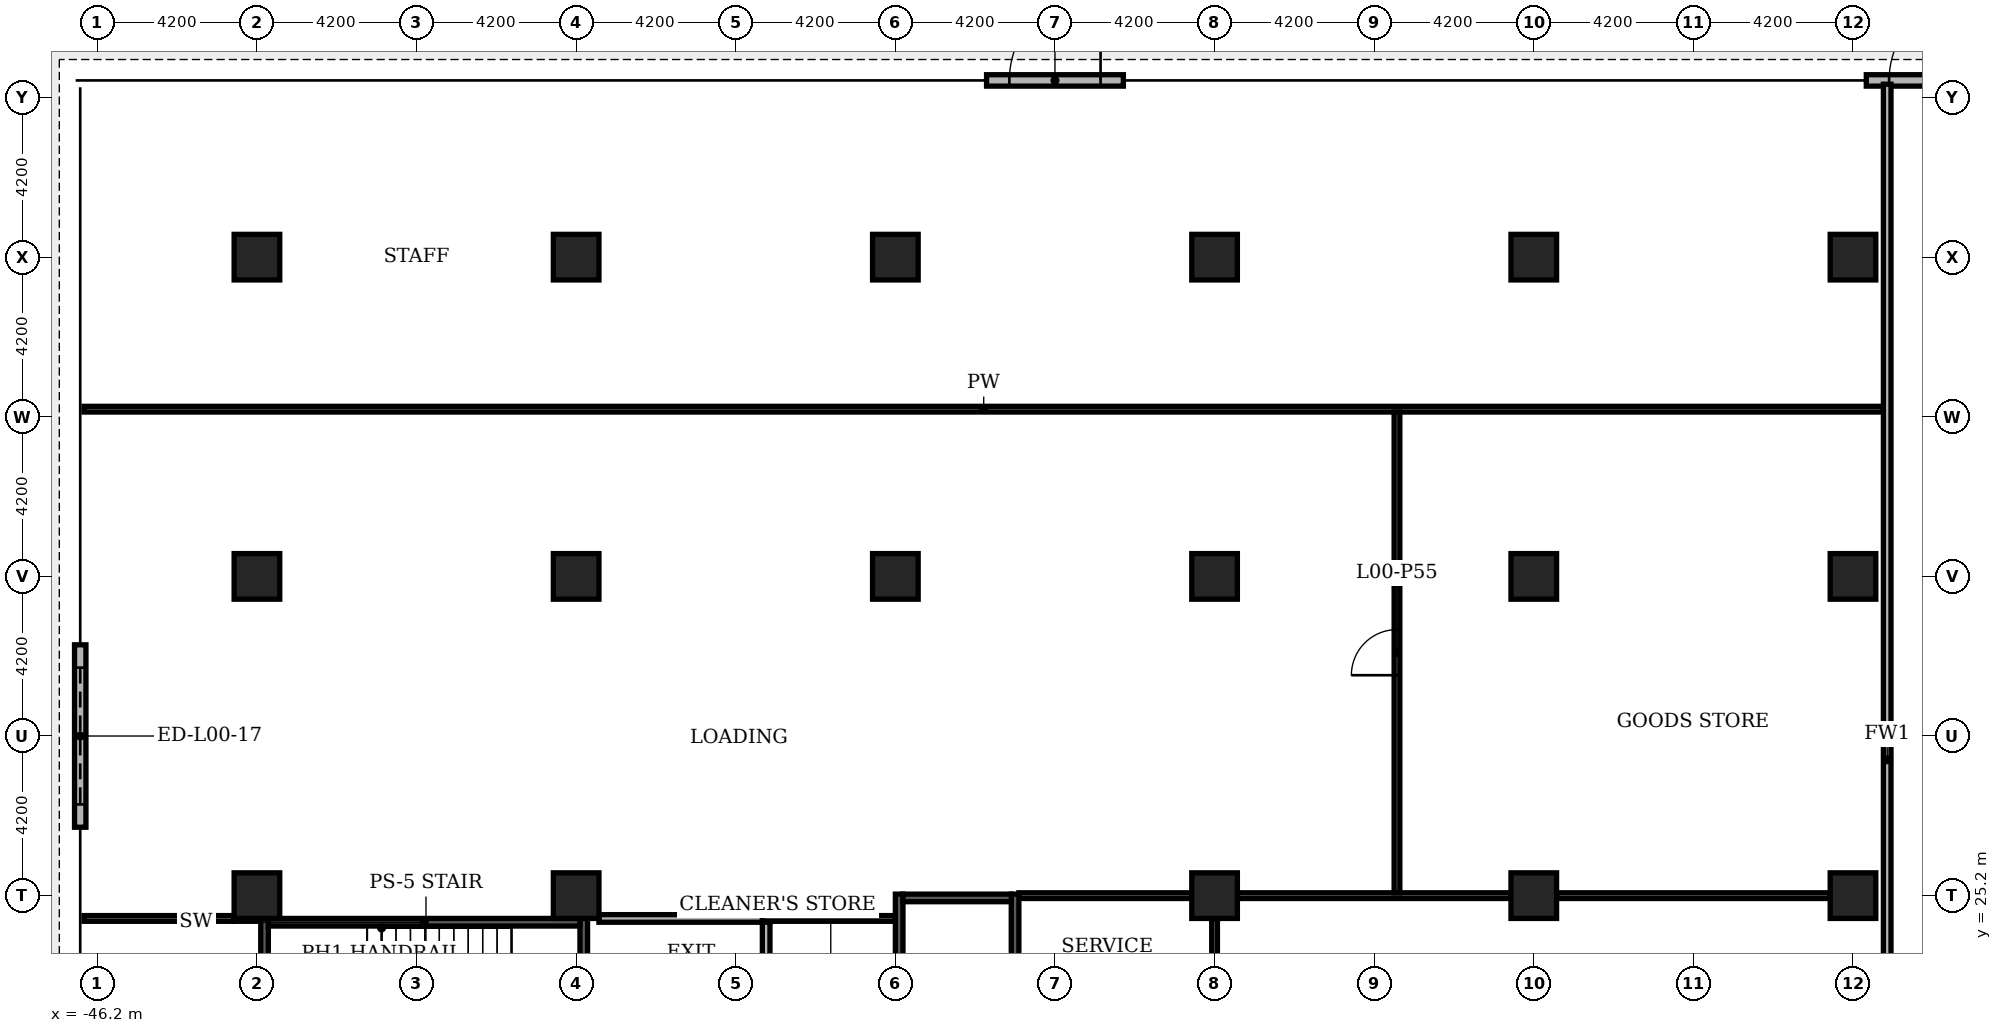
"""IFC4 building model, lengths in metres.
Left out: names, types, materials, properties, quantities, classifications, styles, units other than length and angle.
Written with IfcOpenShell. Run it as: python <this file> out.ifc"""

import sys

from ifc_helpers import new_model, si_unit, direction, frame, frame_2d, origin, origin_2d, place, context, subcontext, project, spatial, rectangle, extrude, element, fill, save


model = new_model("IFC4")
c1 = context("Model", 3, precision=1e-05, world=origin(), true_north=direction((0.0, 1.0)))
c2 = subcontext(c1, "Body", "Model", "MODEL_VIEW")
j1 = project(units=[si_unit("LENGTHUNIT", "METRE"), si_unit("PLANEANGLEUNIT", "RADIAN")], contexts=[c1])
p1 = place(None, origin())
s1 = spatial("IfcSite", under=j1, at=p1, CompositionType="ELEMENT")
p2 = place(p1, origin())
s2 = spatial("IfcBuilding", under=s1, at=p2, CompositionType="ELEMENT")
p3 = place(p2, origin())
s3 = spatial("IfcBuildingStorey", under=s2, at=p3, CompositionType="ELEMENT", Elevation=0.0)
for number, where, z_axis, x_axis in (
    (1, (0.0, 25.2, 0.0), (0.0, 0.0, 1.0), (1.0, 0.0, 0.0)),
    (2, (-8.4, 25.2, 0.0), (0.0, 0.0, 1.0), (1.0, 0.0, 0.0)),
    (3, (-16.8, 25.2, 0.0), (0.0, 0.0, 1.0), (1.0, 0.0, 0.0)),
    (4, (0.0, 33.6, 0.0), (0.0, 0.0, 1.0), (1.0, 0.0, 0.0)),
    (5, (0.0, 42.0, 0.0), (0.0, 0.0, 1.0), (1.0, 0.0, 0.0)),
    (6, (-8.4, 33.6, 0.0), (0.0, 0.0, 1.0), (1.0, 0.0, 0.0)),
    (7, (-8.4, 42.0, 0.0), (0.0, 0.0, 1.0), (1.0, 0.0, 0.0)),
    (8, (-16.8, 33.6, 0.0), (0.0, 0.0, 1.0), (1.0, 0.0, 0.0)),
    (9, (-16.8, 42.0, 0.0), (0.0, 0.0, 1.0), (1.0, 0.0, 0.0)),
    (10, (-25.2, 33.6, 0.0), (0.0, 0.0, 1.0), (1.0, 0.0, 0.0)),
    (11, (-25.2, 42.0, 0.0), (0.0, 0.0, 1.0), (1.0, 0.0, 0.0)),
    (12, (-33.6, 25.2, 0.0), (0.0, 0.0, 1.0), (1.0, 0.0, 0.0)),
    (13, (-33.6, 33.6, 0.0), (0.0, 0.0, 1.0), (1.0, 0.0, 0.0)),
    (14, (-33.6, 42.0, 0.0), (0.0, 0.0, 1.0), (1.0, 0.0, 0.0)),
    (15, (-42.0, 25.2, 0.0), (0.0, 0.0, 1.0), (1.0, 0.0, 0.0)),
    (16, (-42.0, 33.6, 0.0), (0.0, 0.0, 1.0), (1.0, 0.0, 0.0)),
    (17, (-42.0, 42.0, 0.0), (0.0, 0.0, 1.0), (1.0, 0.0, 0.0)),
):
    element("IfcColumn", number, at=place(p3, frame(where, z_axis=z_axis, x_axis=x_axis)), inside=s3, PredefinedType="COLUMN", context=c2, shape_type="SweptSolid", body=[
        extrude(rectangle(XDim=1.2, YDim=1.2, at=origin_2d()), origin(), (0.0, 0.0, 1.0), 7.2),
    ])
p4 = place(p3, frame((8.5, 46.65, 0.0), z_axis=(0.0, 0.0, 1.0), x_axis=(-1.0, 0.0, 0.0)))
e18 = element("IfcWall", 18, at=p4, inside=s3, PredefinedType="STANDARD", context=c2, shape_type="SweptSolid", body=[
    extrude(rectangle(XDim=8.15, YDim=0.3, at=frame_2d((4.075, 0.0))), origin(), (0.0, 0.0, 1.0), 6.78),
])
p5 = place(p4, frame((0.6, 0.0, 0.0)))
e19 = element("IfcOpeningElement", 19, at=p5, cuts=e18, PredefinedType="OPENING", context=c2, shape_type="SweptSolid", body=[
    extrude(rectangle(XDim=2.0, YDim=2.4, at=frame_2d((1.0, 1.2))), frame((0.0, 0.16, 0.0), z_axis=(0.0, -1.0, 0.0), x_axis=(1.0, 0.0, 0.0)), (0.0, 0.0, 1.0), 0.32),
])
p6 = place(p4, frame((2.85, 0.0, 0.0)))
e20 = element("IfcOpeningElement", 20, at=p6, cuts=e18, PredefinedType="OPENING", context=c2, shape_type="SweptSolid", body=[
    extrude(rectangle(XDim=2.3, YDim=2.4, at=frame_2d((1.15, 1.2))), frame((0.0, 0.16, 0.0), z_axis=(0.0, -1.0, 0.0), x_axis=(1.0, 0.0, 0.0)), (0.0, 0.0, 1.0), 0.32),
])
p7 = place(p4, frame((5.25, 0.0, 0.0)))
e21 = element("IfcOpeningElement", 21, at=p7, cuts=e18, PredefinedType="OPENING", context=c2, shape_type="SweptSolid", body=[
    extrude(rectangle(XDim=2.3, YDim=2.4, at=frame_2d((1.15, 1.2))), frame((0.0, 0.16, 0.0), z_axis=(0.0, -1.0, 0.0), x_axis=(1.0, 0.0, 0.0)), (0.0, 0.0, 1.0), 0.32),
])
p8 = place(p3, frame((-19.2, 46.65, 0.0), z_axis=(0.0, 0.0, 1.0), x_axis=(-1.0, 0.0, 0.0)))
e22 = element("IfcWall", 22, at=p8, inside=s3, PredefinedType="STANDARD", context=c2, shape_type="SweptSolid", body=[
    extrude(rectangle(XDim=3.6, YDim=0.3, at=frame_2d((1.8, 0.0))), origin(), (0.0, 0.0, 1.0), 6.78),
])
p9 = place(p8, frame((0.6, 0.0, 0.0)))
e23 = element("IfcOpeningElement", 23, at=p9, cuts=e22, PredefinedType="OPENING", context=c2, shape_type="SweptSolid", body=[
    extrude(rectangle(XDim=2.4, YDim=2.4, at=frame_2d((1.2, 1.2))), frame((0.0, 0.16, 0.0), z_axis=(0.0, -1.0, 0.0), x_axis=(1.0, 0.0, 0.0)), (0.0, 0.0, 1.0), 0.32),
])
p10 = place(p3, frame((-46.65, 31.8, 0.0), z_axis=(0.0, 0.0, 1.0), x_axis=(0.0, -1.0, 0.0)))
e24 = element("IfcWall", 24, at=p10, inside=s3, PredefinedType="STANDARD", context=c2, shape_type="SweptSolid", body=[
    extrude(rectangle(XDim=4.8, YDim=0.3, at=frame_2d((2.4, 0.0))), origin(), (0.0, 0.0, 1.0), 6.78),
])
p11 = place(p10, frame((0.6, 0.0, 0.0)))
e25 = element("IfcOpeningElement", 25, at=p11, cuts=e24, PredefinedType="OPENING", context=c2, shape_type="SweptSolid", body=[
    extrude(rectangle(XDim=3.6, YDim=4.5, at=frame_2d((1.8, 2.25))), frame((0.0, 0.16, 0.0), z_axis=(0.0, -1.0, 0.0), x_axis=(1.0, 0.0, 0.0)), (0.0, 0.0, 1.0), 0.32),
])
p12 = place(p3, frame((-46.55, 24.6, 0.0), z_axis=(0.0, 0.0, 1.0), x_axis=(1.0, 0.0, 0.0)))
e26 = element("IfcWall", 26, at=p12, inside=s3, PredefinedType="PARTITIONING", context=c2, shape_type="SweptSolid", body=[
    extrude(rectangle(XDim=3.95, YDim=0.15, at=frame_2d((1.975, 0.0))), origin(), (0.0, 0.0, 1.0), 6.78),
])
p13 = place(p3, frame((-42.6, 24.6, 0.0), z_axis=(0.0, 0.0, 1.0), x_axis=(1.0, 0.0, 0.0)))
e27 = element("IfcWall", 27, at=p13, inside=s3, PredefinedType="PARTITIONING", context=c2, shape_type="SweptSolid", body=[
    extrude(rectangle(XDim=0.7, YDim=0.15, at=frame_2d((0.35, 0.0))), origin(), (0.0, 0.0, 1.0), 6.78),
])
p14 = place(p3, frame((-33.0, 24.6, 0.0), z_axis=(0.0, 0.0, 1.0), x_axis=(1.0, 0.0, 0.0)))
e28 = element("IfcWall", 28, at=p14, inside=s3, PredefinedType="PARTITIONING", context=c2, shape_type="SweptSolid", body=[
    extrude(rectangle(XDim=4.5, YDim=0.2, at=frame_2d((2.25, 0.0))), origin(), (0.0, 0.0, 1.0), 6.78),
])
p15 = place(p3, frame((-28.7, 24.6, 0.0), z_axis=(0.0, 0.0, 1.0), x_axis=(1.0, 0.0, 0.0)))
e29 = element("IfcWall", 29, at=p15, inside=s3, PredefinedType="PARTITIONING", context=c2, shape_type="SweptSolid", body=[
    extrude(rectangle(XDim=3.5, YDim=0.15, at=frame_2d((1.75, 0.0))), origin(), (0.0, 0.0, 1.0), 6.78),
])
p16 = place(p3, frame((-21.95, 25.2, 0.0), z_axis=(0.0, 0.0, 1.0), x_axis=(1.0, 0.0, 0.0)))
e30 = element("IfcWall", 30, at=p16, inside=s3, PredefinedType="PARTITIONING", context=c2, shape_type="SweptSolid", body=[
    extrude(rectangle(XDim=4.55, YDim=0.15, at=frame_2d((2.275, 0.0))), origin(), (0.0, 0.0, 1.0), 6.48),
])
for number, where, z_axis, x_axis in (
    (31, (-16.2, 25.2, 0.0), (0.0, 0.0, 1.0), (1.0, 0.0, 0.0)),
    (32, (-7.8, 25.2, 0.0), (0.0, 0.0, 1.0), (1.0, 0.0, 0.0)),
):
    element("IfcWall", number, at=place(p3, frame(where, z_axis=z_axis, x_axis=x_axis)), inside=s3, PredefinedType="PARTITIONING", context=c2, shape_type="SweptSolid", body=[
        extrude(rectangle(XDim=7.2, YDim=0.15, at=frame_2d((3.6, 0.0))), origin(), (0.0, 0.0, 1.0), 6.48),
    ])
p17 = place(p3, frame((-46.55, 38.0, 0.0), z_axis=(0.0, 0.0, 1.0), x_axis=(1.0, 0.0, 0.0)))
e33 = element("IfcWall", 33, at=p17, inside=s3, PredefinedType="PARTITIONING", context=c2, shape_type="SweptSolid", body=[
    extrude(rectangle(XDim=47.35, YDim=0.15, at=frame_2d((23.675, 0.0))), origin(), (0.0, 0.0, 1.0), 6.38),
])
p18 = place(p3, frame((-28.6, 20.55, 0.0), z_axis=(0.0, 0.0, 1.0), x_axis=(0.0, 1.0, 0.0)))
e34 = element("IfcWall", 34, at=p18, inside=s3, PredefinedType="PARTITIONING", context=c2, shape_type="SweptSolid", body=[
    extrude(rectangle(XDim=3.95, YDim=0.2, at=frame_2d((1.975, 0.0))), origin(), (0.0, 0.0, 1.0), 6.78),
])
p19 = place(p3, frame((-16.8, 17.1, 0.0), z_axis=(0.0, 0.0, 1.0), x_axis=(0.0, 1.0, 0.0)))
e35 = element("IfcWall", 35, at=p19, inside=s3, PredefinedType="PARTITIONING", context=c2, shape_type="SweptSolid", body=[
    extrude(rectangle(XDim=7.5, YDim=0.15, at=frame_2d((3.75, 0.0))), origin(), (0.0, 0.0, 1.0), 6.78),
])
p20 = place(p3, frame((-12.0, 25.275, 0.0), z_axis=(0.0, 0.0, 1.0), x_axis=(0.0, 1.0, 0.0)))
e36 = element("IfcWall", 36, at=p20, inside=s3, PredefinedType="PARTITIONING", context=c2, shape_type="SweptSolid", body=[
    extrude(rectangle(XDim=12.65, YDim=0.15, at=frame_2d((6.325, 0.0))), origin(), (0.0, 0.0, 1.0), 6.48),
])
p21 = place(p20, frame((5.725, 0.0, 0.0)))
e37 = element("IfcOpeningElement", 37, at=p21, cuts=e36, PredefinedType="OPENING", context=c2, shape_type="SweptSolid", body=[
    extrude(rectangle(XDim=1.2, YDim=2.2, at=frame_2d((0.6, 1.1))), frame((0.0, 0.085, 0.0), z_axis=(0.0, -1.0, 0.0), x_axis=(1.0, 0.0, 0.0)), (0.0, 0.0, 1.0), 0.17),
])
p22 = place(p3, frame((0.9, 11.0, 0.0), z_axis=(0.0, 0.0, 1.0), x_axis=(0.0, 1.0, 0.0)))
e38 = element("IfcWall", 38, at=p22, inside=s3, PredefinedType="PARTITIONING", context=c2, shape_type="SweptSolid", body=[
    extrude(rectangle(XDim=35.55, YDim=0.2, at=frame_2d((17.775, 0.0))), origin(), (0.0, 0.0, 1.0), 6.48),
])
p23 = place(p3, frame((-25.1, 18.5, 0.0), z_axis=(0.0, 0.0, 1.0), x_axis=(0.0, 1.0, 0.0)))
e39 = element("IfcWall", 39, at=p23, inside=s3, PredefinedType="SOLIDWALL", context=c2, shape_type="SweptSolid", body=[
    extrude(rectangle(XDim=6.74, YDim=0.2, at=frame_2d((3.37, 0.0))), origin(), (0.0, 0.0, 1.0), 6.38),
])
p24 = place(p3, frame((-22.05, 18.5, 0.0), z_axis=(0.0, 0.0, 1.0), x_axis=(0.0, 1.0, 0.0)))
e40 = element("IfcWall", 40, at=p24, inside=s3, PredefinedType="SOLIDWALL", context=c2, shape_type="SweptSolid", body=[
    extrude(rectangle(XDim=6.74, YDim=0.2, at=frame_2d((3.37, 0.0))), origin(), (0.0, 0.0, 1.0), 6.78),
])
p25 = place(p3, frame((-25.0, 25.14, 0.0), z_axis=(0.0, 0.0, 1.0), x_axis=(1.0, 0.0, 0.0)))
e41 = element("IfcWall", 41, at=p25, inside=s3, PredefinedType="SOLIDWALL", context=c2, shape_type="SweptSolid", body=[
    extrude(rectangle(XDim=2.85, YDim=0.2, at=frame_2d((1.425, 0.0))), origin(), (0.0, 0.0, 1.0), 6.48),
])
p26 = place(p3, frame((-41.8, 20.45, 0.0), z_axis=(0.0, 0.0, 1.0), x_axis=(0.0, 1.0, 0.0)))
e42 = element("IfcWall", 42, at=p26, inside=s3, PredefinedType="SOLIDWALL", context=c2, shape_type="SweptSolid", body=[
    extrude(rectangle(XDim=4.15, YDim=0.2, at=frame_2d((2.075, 0.0))), origin(), (0.0, 0.0, 1.0), 6.38),
])
p27 = place(p3, frame((-33.4, 20.45, 0.0), z_axis=(0.0, 0.0, 1.0), x_axis=(0.0, 1.0, 0.0)))
e43 = element("IfcWall", 43, at=p27, inside=s3, PredefinedType="SOLIDWALL", context=c2, shape_type="SweptSolid", body=[
    extrude(rectangle(XDim=4.15, YDim=0.2, at=frame_2d((2.075, 0.0))), origin(), (0.0, 0.0, 1.0), 6.38),
])
p28 = place(p27, frame((1.175, 0.0, 0.0)))
e44 = element("IfcOpeningElement", 44, at=p28, cuts=e43, PredefinedType="OPENING", context=c2, shape_type="SweptSolid", body=[
    extrude(rectangle(XDim=1.8, YDim=2.2, at=frame_2d((0.9, 1.1))), frame((0.0, 0.11, 0.0), z_axis=(0.0, -1.0, 0.0), x_axis=(1.0, 0.0, 0.0)), (0.0, 0.0, 1.0), 0.22),
])
p29 = place(p3, frame((-41.7, 24.5, 0.0), z_axis=(0.0, 0.0, 1.0), x_axis=(1.0, 0.0, 0.0)))
e45 = element("IfcWall", 45, at=p29, inside=s3, PredefinedType="SOLIDWALL", context=c2, shape_type="SweptSolid", body=[
    extrude(rectangle(XDim=8.2, YDim=0.2, at=frame_2d((4.1, 0.0))), origin(), (0.0, 0.0, 1.0), 7.0),
])
p30 = place(p7, frame((2.3, 0.0, 0.0), z_axis=(0.0, 0.0, 1.0), x_axis=(-1.0, 0.0, 0.0)))
e46 = element("IfcDoor", 46, at=p30, inside=s3, OperationType="SINGLE_SWING_LEFT", PredefinedType="DOOR", context=c2, shape_type="SweptSolid", body=[
    extrude(rectangle(XDim=2.3, YDim=2.4, at=frame_2d((1.15, 1.2))), frame((0.0, 0.025, 0.0), z_axis=(0.0, -1.0, 0.0), x_axis=(1.0, 0.0, 0.0)), (0.0, 0.0, 1.0), 0.05),
])
fill(e21, e46)
p31 = place(p9, frame((2.4, 0.0, 0.0), z_axis=(0.0, 0.0, 1.0), x_axis=(-1.0, 0.0, 0.0)))
e47 = element("IfcDoor", 47, at=p31, inside=s3, OperationType="DOUBLE_DOOR_SINGLE_SWING", PredefinedType="DOOR", context=c2, shape_type="SweptSolid", body=[
    extrude(rectangle(XDim=2.4, YDim=2.4, at=frame_2d((1.2, 1.2))), frame((0.0, 0.025, 0.0), z_axis=(0.0, -1.0, 0.0), x_axis=(1.0, 0.0, 0.0)), (0.0, 0.0, 1.0), 0.05),
])
fill(e23, e47)
p32 = place(p11, origin())
e48 = element("IfcDoor", 48, at=p32, inside=s3, OperationType="ROLLINGUP", PredefinedType="GATE", context=c2, shape_type="SweptSolid", body=[
    extrude(rectangle(XDim=3.6, YDim=4.5, at=frame_2d((1.8, 2.25))), frame((0.0, 0.025, 0.0), z_axis=(0.0, -1.0, 0.0), x_axis=(1.0, 0.0, 0.0)), (0.0, 0.0, 1.0), 0.05),
])
fill(e25, e48)
p33 = place(p21, origin())
e49 = element("IfcDoor", 49, at=p33, inside=s3, OperationType="SINGLE_SWING_LEFT", PredefinedType="DOOR", context=c2, shape_type="SweptSolid", body=[
    extrude(rectangle(XDim=1.2, YDim=2.2, at=frame_2d((0.6, 1.1))), frame((0.0, 0.025, 0.0), z_axis=(0.0, -1.0, 0.0), x_axis=(1.0, 0.0, 0.0)), (0.0, 0.0, 1.0), 0.05),
])
fill(e37, e49)
save(model, sys.argv[1])
